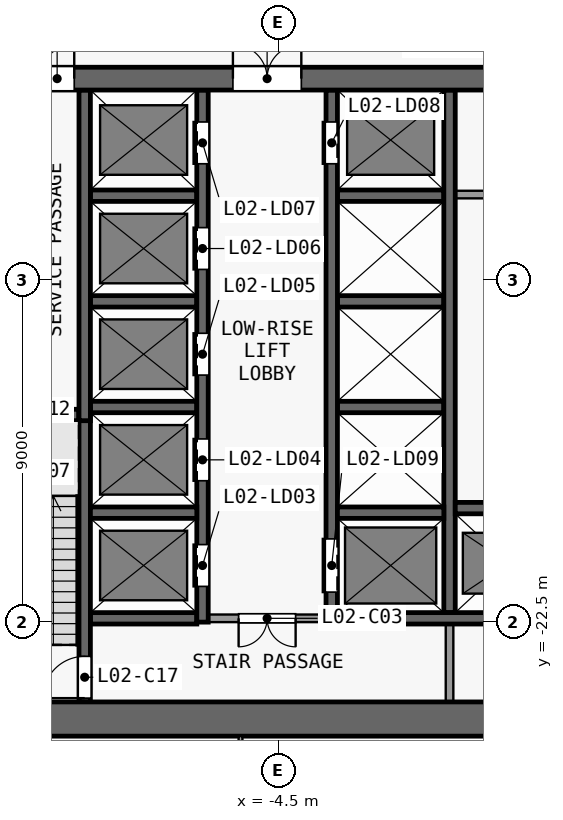
"""IFC4 building model, lengths in metres.
Left out: names, types, materials, properties, quantities, classifications, styles, units other than length and angle.
Written with IfcOpenShell. Run it as: python <this file> out.ifc"""

import sys

from ifc_helpers import new_model, si_unit, direction, frame, frame_2d, origin, place, context, subcontext, project, spatial, rectangle, extrude, element, fill, save


model = new_model("IFC4")
c1 = context("Model", 3, precision=1e-05, world=origin(), true_north=direction((0.0, 1.0)))
c2 = subcontext(c1, "Body", "Model", "MODEL_VIEW")
j1 = project(units=[si_unit("LENGTHUNIT", "METRE"), si_unit("PLANEANGLEUNIT", "RADIAN")], contexts=[c1])
p1 = place(None, origin())
s1 = spatial("IfcSite", under=j1, at=p1, CompositionType="ELEMENT")
p2 = place(p1, origin())
s2 = spatial("IfcBuilding", under=s1, at=p2, CompositionType="ELEMENT")
p3 = place(p2, frame((0.0, 0.0, 13.5)))
s3 = spatial("IfcBuildingStorey", under=s2, at=p3, CompositionType="ELEMENT", Elevation=13.5)
p4 = place(p3, frame((-13.5, -25.05, 0.0), z_axis=(0.0, 0.0, 1.0), x_axis=(1.0, 0.0, 0.0)))
e1 = element("IfcWall", 1, at=p4, inside=s3, PredefinedType="SHEAR", context=c2, shape_type="SweptSolid", body=[
    extrude(rectangle(XDim=27.0, YDim=0.9, at=frame_2d((13.5, 0.0))), origin(), (0.0, 0.0, 1.0), 4.65),
])
p5 = place(p3, frame((-13.5, -8.2, 0.0), z_axis=(0.0, 0.0, 1.0), x_axis=(1.0, 0.0, 0.0)))
e2 = element("IfcWall", 2, at=p5, inside=s3, PredefinedType="SHEAR", context=c2, shape_type="SweptSolid", body=[
    extrude(rectangle(XDim=27.0, YDim=0.6, at=frame_2d((13.5, 0.0))), origin(), (0.0, 0.0, 1.0), 4.65),
])
p6 = place(p5, frame((7.8, 0.0, 0.0)))
e3 = element("IfcOpeningElement", 3, at=p6, cuts=e2, PredefinedType="OPENING", context=c2, shape_type="SweptSolid", body=[
    extrude(rectangle(XDim=1.8, YDim=2.1, at=frame_2d((0.9, 1.05))), frame((0.0, 0.31, 0.0), z_axis=(0.0, -1.0, 0.0), x_axis=(1.0, 0.0, 0.0)), (0.0, 0.0, 1.0), 0.62),
])
p7 = place(p5, frame((17.4, 0.0, 0.0)))
e4 = element("IfcOpeningElement", 4, at=p7, cuts=e2, PredefinedType="OPENING", context=c2, shape_type="SweptSolid", body=[
    extrude(rectangle(XDim=1.8, YDim=2.1, at=frame_2d((0.9, 1.05))), frame((0.0, 0.31, 0.0), z_axis=(0.0, -1.0, 0.0), x_axis=(1.0, 0.0, 0.0)), (0.0, 0.0, 1.0), 0.62),
])
p8 = place(p5, frame((2.725, 0.0, 0.0)))
e5 = element("IfcOpeningElement", 5, at=p8, cuts=e2, PredefinedType="OPENING", context=c2, shape_type="SweptSolid", body=[
    extrude(rectangle(XDim=0.9, YDim=2.1, at=frame_2d((0.45, 1.05))), frame((0.0, 0.31, 0.0), z_axis=(0.0, -1.0, 0.0), x_axis=(1.0, 0.0, 0.0)), (0.0, 0.0, 1.0), 0.62),
])
p9 = place(p5, frame((23.375, 0.0, 0.0)))
e6 = element("IfcOpeningElement", 6, at=p9, cuts=e2, PredefinedType="OPENING", context=c2, shape_type="SweptSolid", body=[
    extrude(rectangle(XDim=0.9, YDim=2.1, at=frame_2d((0.45, 1.05))), frame((0.0, 0.31, 0.0), z_axis=(0.0, -1.0, 0.0), x_axis=(1.0, 0.0, 0.0)), (0.0, 0.0, 1.0), 0.62),
])
p10 = place(p3, frame((-9.45, -22.4, 0.0), z_axis=(0.0, 0.0, 1.0), x_axis=(1.0, 0.0, 0.0)))
e7 = element("IfcWall", 7, at=p10, inside=s3, PredefinedType="SHEAR", context=c2, shape_type="SweptSolid", body=[
    extrude(rectangle(XDim=2.8, YDim=0.3, at=frame_2d((1.4, 0.0))), origin(), (0.0, 0.0, 1.0), 4.65),
])
p11 = place(p3, frame((-3.25, -22.4, 0.0), z_axis=(0.0, 0.0, 1.0), x_axis=(-1.0, 0.0, 0.0)))
e8 = element("IfcWall", 8, at=p11, inside=s3, PredefinedType="PARTITIONING", context=c2, shape_type="SweptSolid", body=[
    extrude(rectangle(XDim=3.1, YDim=0.2, at=frame_2d((1.55, 0.0))), origin(), (0.0, 0.0, 1.0), 4.65),
])
p12 = place(p11, frame((0.8, 0.0, 0.0)))
e9 = element("IfcOpeningElement", 9, at=p12, cuts=e8, PredefinedType="OPENING", context=c2, shape_type="SweptSolid", body=[
    extrude(rectangle(XDim=1.5, YDim=2.1, at=frame_2d((0.75, 1.05))), frame((0.0, 0.11, 0.0), z_axis=(0.0, -1.0, 0.0), x_axis=(1.0, 0.0, 0.0)), (0.0, 0.0, 1.0), 0.22),
])
p13 = place(p3, frame((-2.95, -22.4, 0.0), z_axis=(0.0, 0.0, 1.0), x_axis=(1.0, 0.0, 0.0)))
e10 = element("IfcWall", 10, at=p13, inside=s3, PredefinedType="SHEAR", context=c2, shape_type="SweptSolid", body=[
    extrude(rectangle(XDim=6.2, YDim=0.3, at=frame_2d((3.1, 0.0))), origin(), (0.0, 0.0, 1.0), 4.65),
])
for number, where, z_axis, x_axis in (
    (11, (-9.45, -19.62, 0.0), (0.0, 0.0, 1.0), (1.0, 0.0, 0.0)),
    (12, (-2.95, -19.62, 0.0), (0.0, 0.0, 1.0), (1.0, 0.0, 0.0)),
):
    element("IfcWall", number, at=place(p3, frame(where, z_axis=z_axis, x_axis=x_axis)), inside=s3, PredefinedType="SHEAR", context=c2, shape_type="SweptSolid", body=[
        extrude(rectangle(XDim=2.8, YDim=0.3, at=frame_2d((1.4, 0.0))), origin(), (0.0, 0.0, 1.0), 4.65),
    ])
p14 = place(p3, frame((0.15, -19.5, 0.0), z_axis=(0.0, 0.0, 1.0), x_axis=(1.0, 0.0, 0.0)))
e13 = element("IfcWall", 13, at=p14, inside=s3, PredefinedType="SHEAR", context=c2, shape_type="SweptSolid", body=[
    extrude(rectangle(XDim=3.05, YDim=0.3, at=frame_2d((1.525, 0.0))), origin(), (0.0, 0.0, 1.0), 4.65),
])
p15 = place(p3, frame((-12.6, -17.05, 0.0), z_axis=(0.0, 0.0, 1.0), x_axis=(1.0, 0.0, 0.0)))
e14 = element("IfcWall", 14, at=p15, inside=s3, PredefinedType="SHEAR", context=c2, shape_type="SweptSolid", body=[
    extrude(rectangle(XDim=2.85, YDim=0.3, at=frame_2d((1.425, 0.0))), origin(), (0.0, 0.0, 1.0), 4.65),
])
for number, where, z_axis, x_axis in (
    (15, (-9.45, -16.84, 0.0), (0.0, 0.0, 1.0), (1.0, 0.0, 0.0)),
    (16, (-2.95, -16.84, 0.0), (0.0, 0.0, 1.0), (1.0, 0.0, 0.0)),
    (17, (-9.45, -14.06, 0.0), (0.0, 0.0, 1.0), (1.0, 0.0, 0.0)),
    (18, (-2.95, -14.06, 0.0), (0.0, 0.0, 1.0), (1.0, 0.0, 0.0)),
    (19, (-9.45, -11.28, 0.0), (0.0, 0.0, 1.0), (1.0, 0.0, 0.0)),
    (20, (-2.95, -11.28, 0.0), (0.0, 0.0, 1.0), (1.0, 0.0, 0.0)),
):
    element("IfcWall", number, at=place(p3, frame(where, z_axis=z_axis, x_axis=x_axis)), inside=s3, PredefinedType="SHEAR", context=c2, shape_type="SweptSolid", body=[
        extrude(rectangle(XDim=2.8, YDim=0.3, at=frame_2d((1.4, 0.0))), origin(), (0.0, 0.0, 1.0), 4.65),
    ])
p16 = place(p3, frame((0.15, -11.25, 0.0), z_axis=(0.0, 0.0, 1.0), x_axis=(1.0, 0.0, 0.0)))
e21 = element("IfcWall", 21, at=p16, inside=s3, PredefinedType="PARTITIONING", context=c2, shape_type="SweptSolid", body=[
    extrude(rectangle(XDim=3.025, YDim=0.2, at=frame_2d((1.513, 0.0))), origin(), (0.0, 0.0, 1.0), 4.65),
])
p17 = place(p3, frame((-9.6, -24.6, 0.0), z_axis=(0.0, 0.0, 1.0), x_axis=(0.0, 1.0, 0.0)))
e22 = element("IfcWall", 22, at=p17, inside=s3, PredefinedType="SHEAR", context=c2, shape_type="SweptSolid", body=[
    extrude(rectangle(XDim=7.7, YDim=0.3, at=frame_2d((3.85, 0.0))), origin(), (0.0, 0.0, 1.0), 4.65),
])
p18 = place(p17, frame((0.1, 0.0, 0.0)))
e23 = element("IfcOpeningElement", 23, at=p18, cuts=e22, PredefinedType="OPENING", context=c2, shape_type="SweptSolid", body=[
    extrude(rectangle(XDim=1.1, YDim=2.1, at=frame_2d((0.55, 1.05))), frame((0.0, 0.16, 0.0), z_axis=(0.0, -1.0, 0.0), x_axis=(1.0, 0.0, 0.0)), (0.0, 0.0, 1.0), 0.32),
])
p19 = place(p3, frame((-9.6, -17.2, 0.0), z_axis=(0.0, 0.0, 1.0), x_axis=(0.0, 1.0, 0.0)))
e24 = element("IfcWall", 24, at=p19, inside=s3, PredefinedType="SHEAR", context=c2, shape_type="SweptSolid", body=[
    extrude(rectangle(XDim=8.7, YDim=0.3, at=frame_2d((4.35, 0.0))), origin(), (0.0, 0.0, 1.0), 4.65),
])
p20 = place(p3, frame((-6.5, -22.5, 0.0), z_axis=(0.0, 0.0, 1.0), x_axis=(0.0, 1.0, 0.0)))
e25 = element("IfcWall", 25, at=p20, inside=s3, PredefinedType="SHEAR", context=c2, shape_type="SweptSolid", body=[
    extrude(rectangle(XDim=14.0, YDim=0.3, at=frame_2d((7.0, 0.0))), origin(), (0.0, 0.0, 1.0), 4.65),
])
p21 = place(p20, frame((0.94, 0.0, 0.0)))
e26 = element("IfcOpeningElement", 26, at=p21, cuts=e25, PredefinedType="OPENING", context=c2, shape_type="SweptSolid", body=[
    extrude(rectangle(XDim=1.1, YDim=2.1, at=frame_2d((0.55, 1.05))), frame((0.0, 0.16, 0.0), z_axis=(0.0, -1.0, 0.0), x_axis=(1.0, 0.0, 0.0)), (0.0, 0.0, 1.0), 0.32),
])
p22 = place(p20, frame((3.72, 0.0, 0.0)))
e27 = element("IfcOpeningElement", 27, at=p22, cuts=e25, PredefinedType="OPENING", context=c2, shape_type="SweptSolid", body=[
    extrude(rectangle(XDim=1.1, YDim=2.1, at=frame_2d((0.55, 1.05))), frame((0.0, 0.16, 0.0), z_axis=(0.0, -1.0, 0.0), x_axis=(1.0, 0.0, 0.0)), (0.0, 0.0, 1.0), 0.32),
])
p23 = place(p20, frame((6.5, 0.0, 0.0)))
e28 = element("IfcOpeningElement", 28, at=p23, cuts=e25, PredefinedType="OPENING", context=c2, shape_type="SweptSolid", body=[
    extrude(rectangle(XDim=1.1, YDim=2.1, at=frame_2d((0.55, 1.05))), frame((0.0, 0.16, 0.0), z_axis=(0.0, -1.0, 0.0), x_axis=(1.0, 0.0, 0.0)), (0.0, 0.0, 1.0), 0.32),
])
p24 = place(p20, frame((9.28, 0.0, 0.0)))
e29 = element("IfcOpeningElement", 29, at=p24, cuts=e25, PredefinedType="OPENING", context=c2, shape_type="SweptSolid", body=[
    extrude(rectangle(XDim=1.1, YDim=2.1, at=frame_2d((0.55, 1.05))), frame((0.0, 0.16, 0.0), z_axis=(0.0, -1.0, 0.0), x_axis=(1.0, 0.0, 0.0)), (0.0, 0.0, 1.0), 0.32),
])
p25 = place(p20, frame((12.06, 0.0, 0.0)))
e30 = element("IfcOpeningElement", 30, at=p25, cuts=e25, PredefinedType="OPENING", context=c2, shape_type="SweptSolid", body=[
    extrude(rectangle(XDim=1.1, YDim=2.1, at=frame_2d((0.55, 1.05))), frame((0.0, 0.16, 0.0), z_axis=(0.0, -1.0, 0.0), x_axis=(1.0, 0.0, 0.0)), (0.0, 0.0, 1.0), 0.32),
])
p26 = place(p3, frame((-3.1, -22.55, 0.0), z_axis=(0.0, 0.0, 1.0), x_axis=(0.0, 1.0, 0.0)))
e31 = element("IfcWall", 31, at=p26, inside=s3, PredefinedType="SHEAR", context=c2, shape_type="SweptSolid", body=[
    extrude(rectangle(XDim=14.05, YDim=0.3, at=frame_2d((7.025, 0.0))), origin(), (0.0, 0.0, 1.0), 4.65),
])
p27 = place(p26, frame((12.11, 0.0, 0.0)))
e32 = element("IfcOpeningElement", 32, at=p27, cuts=e31, PredefinedType="OPENING", context=c2, shape_type="SweptSolid", body=[
    extrude(rectangle(XDim=1.1, YDim=2.1, at=frame_2d((0.55, 1.05))), frame((0.0, 0.16, 0.0), z_axis=(0.0, -1.0, 0.0), x_axis=(1.0, 0.0, 0.0)), (0.0, 0.0, 1.0), 0.32),
])
p28 = place(p26, frame((0.84, 0.0, 0.0)))
e33 = element("IfcOpeningElement", 33, at=p28, cuts=e31, PredefinedType="OPENING", context=c2, shape_type="SweptSolid", body=[
    extrude(rectangle(XDim=1.4, YDim=2.1, at=frame_2d((0.7, 1.05))), frame((0.0, 0.16, 0.0), z_axis=(0.0, -1.0, 0.0), x_axis=(1.0, 0.0, 0.0)), (0.0, 0.0, 1.0), 0.32),
])
p29 = place(p3, frame((0.0, -24.6, 0.0), z_axis=(0.0, 0.0, 1.0), x_axis=(0.0, 1.0, 0.0)))
e34 = element("IfcWall", 34, at=p29, inside=s3, PredefinedType="PARTITIONING", context=c2, shape_type="SweptSolid", body=[
    extrude(rectangle(XDim=2.05, YDim=0.2, at=frame_2d((1.025, 0.0))), origin(), (0.0, 0.0, 1.0), 4.65),
])
p30 = place(p3, frame((0.0, -22.25, 0.0), z_axis=(0.0, 0.0, 1.0), x_axis=(0.0, 1.0, 0.0)))
e35 = element("IfcWall", 35, at=p30, inside=s3, PredefinedType="SHEAR", context=c2, shape_type="SweptSolid", body=[
    extrude(rectangle(XDim=13.75, YDim=0.3, at=frame_2d((6.875, 0.0))), origin(), (0.0, 0.0, 1.0), 4.65),
])
p31 = place(p3, frame((-5.5, -31.4, 0.0), z_axis=(0.0, 0.0, 1.0), x_axis=(0.0, 1.0, 0.0)))
e36 = element("IfcWall", 36, at=p31, inside=s3, PredefinedType="PARTITIONING", context=c2, shape_type="SweptSolid", body=[
    extrude(rectangle(XDim=5.9, YDim=0.1, at=frame_2d((2.95, 0.0))), origin(), (0.0, 0.0, 1.0), 4.65),
])
p32 = place(p21, origin())
e37 = element("IfcDoor", 37, at=p32, inside=s3, OperationType="DOUBLE_DOOR_SLIDING", PredefinedType="DOOR", context=c2, shape_type="SweptSolid", body=[
    extrude(rectangle(XDim=1.1, YDim=2.1, at=frame_2d((0.55, 1.05))), frame((0.0, 0.025, 0.0), z_axis=(0.0, -1.0, 0.0), x_axis=(1.0, 0.0, 0.0)), (0.0, 0.0, 1.0), 0.05),
])
fill(e26, e37)
p33 = place(p22, origin())
e38 = element("IfcDoor", 38, at=p33, inside=s3, OperationType="DOUBLE_DOOR_SLIDING", PredefinedType="DOOR", context=c2, shape_type="SweptSolid", body=[
    extrude(rectangle(XDim=1.1, YDim=2.1, at=frame_2d((0.55, 1.05))), frame((0.0, 0.025, 0.0), z_axis=(0.0, -1.0, 0.0), x_axis=(1.0, 0.0, 0.0)), (0.0, 0.0, 1.0), 0.05),
])
fill(e27, e38)
p34 = place(p23, origin())
e39 = element("IfcDoor", 39, at=p34, inside=s3, OperationType="DOUBLE_DOOR_SLIDING", PredefinedType="DOOR", context=c2, shape_type="SweptSolid", body=[
    extrude(rectangle(XDim=1.1, YDim=2.1, at=frame_2d((0.55, 1.05))), frame((0.0, 0.025, 0.0), z_axis=(0.0, -1.0, 0.0), x_axis=(1.0, 0.0, 0.0)), (0.0, 0.0, 1.0), 0.05),
])
fill(e28, e39)
p35 = place(p24, origin())
e40 = element("IfcDoor", 40, at=p35, inside=s3, OperationType="DOUBLE_DOOR_SLIDING", PredefinedType="DOOR", context=c2, shape_type="SweptSolid", body=[
    extrude(rectangle(XDim=1.1, YDim=2.1, at=frame_2d((0.55, 1.05))), frame((0.0, 0.025, 0.0), z_axis=(0.0, -1.0, 0.0), x_axis=(1.0, 0.0, 0.0)), (0.0, 0.0, 1.0), 0.05),
])
fill(e29, e40)
p36 = place(p25, origin())
e41 = element("IfcDoor", 41, at=p36, inside=s3, OperationType="DOUBLE_DOOR_SLIDING", PredefinedType="DOOR", context=c2, shape_type="SweptSolid", body=[
    extrude(rectangle(XDim=1.1, YDim=2.1, at=frame_2d((0.55, 1.05))), frame((0.0, 0.025, 0.0), z_axis=(0.0, -1.0, 0.0), x_axis=(1.0, 0.0, 0.0)), (0.0, 0.0, 1.0), 0.05),
])
fill(e30, e41)
p37 = place(p27, origin())
e42 = element("IfcDoor", 42, at=p37, inside=s3, OperationType="DOUBLE_DOOR_SLIDING", PredefinedType="DOOR", context=c2, shape_type="SweptSolid", body=[
    extrude(rectangle(XDim=1.1, YDim=2.1, at=frame_2d((0.55, 1.05))), frame((0.0, 0.025, 0.0), z_axis=(0.0, -1.0, 0.0), x_axis=(1.0, 0.0, 0.0)), (0.0, 0.0, 1.0), 0.05),
])
fill(e32, e42)
p38 = place(p28, origin())
e43 = element("IfcDoor", 43, at=p38, inside=s3, OperationType="DOUBLE_DOOR_SLIDING", PredefinedType="DOOR", context=c2, shape_type="SweptSolid", body=[
    extrude(rectangle(XDim=1.4, YDim=2.1, at=frame_2d((0.7, 1.05))), frame((0.0, 0.025, 0.0), z_axis=(0.0, -1.0, 0.0), x_axis=(1.0, 0.0, 0.0)), (0.0, 0.0, 1.0), 0.05),
])
fill(e33, e43)
p39 = place(p12, origin())
e44 = element("IfcDoor", 44, at=p39, inside=s3, OperationType="DOUBLE_DOOR_SINGLE_SWING", PredefinedType="DOOR", context=c2, shape_type="SweptSolid", body=[
    extrude(rectangle(XDim=1.5, YDim=2.1, at=frame_2d((0.75, 1.05))), frame((0.0, 0.025, 0.0), z_axis=(0.0, -1.0, 0.0), x_axis=(1.0, 0.0, 0.0)), (0.0, 0.0, 1.0), 0.05),
])
fill(e9, e44)
p40 = place(p6, origin())
e45 = element("IfcDoor", 45, at=p40, inside=s3, OperationType="DOUBLE_DOOR_SINGLE_SWING", PredefinedType="DOOR", context=c2, shape_type="SweptSolid", body=[
    extrude(rectangle(XDim=1.8, YDim=2.1, at=frame_2d((0.9, 1.05))), frame((0.0, 0.025, 0.0), z_axis=(0.0, -1.0, 0.0), x_axis=(1.0, 0.0, 0.0)), (0.0, 0.0, 1.0), 0.05),
])
fill(e3, e45)
p41 = place(p8, origin())
e46 = element("IfcDoor", 46, at=p41, inside=s3, OperationType="SINGLE_SWING_RIGHT", PredefinedType="DOOR", context=c2, shape_type="SweptSolid", body=[
    extrude(rectangle(XDim=0.9, YDim=2.1, at=frame_2d((0.45, 1.05))), frame((0.0, 0.025, 0.0), z_axis=(0.0, -1.0, 0.0), x_axis=(1.0, 0.0, 0.0)), (0.0, 0.0, 1.0), 0.05),
])
fill(e5, e46)
p42 = place(p18, origin())
e47 = element("IfcDoor", 47, at=p42, inside=s3, OperationType="SINGLE_SWING_LEFT", PredefinedType="DOOR", context=c2, shape_type="SweptSolid", body=[
    extrude(rectangle(XDim=1.1, YDim=2.1, at=frame_2d((0.55, 1.05))), frame((0.0, 0.025, 0.0), z_axis=(0.0, -1.0, 0.0), x_axis=(1.0, 0.0, 0.0)), (0.0, 0.0, 1.0), 0.05),
])
fill(e23, e47)
save(model, sys.argv[1])
